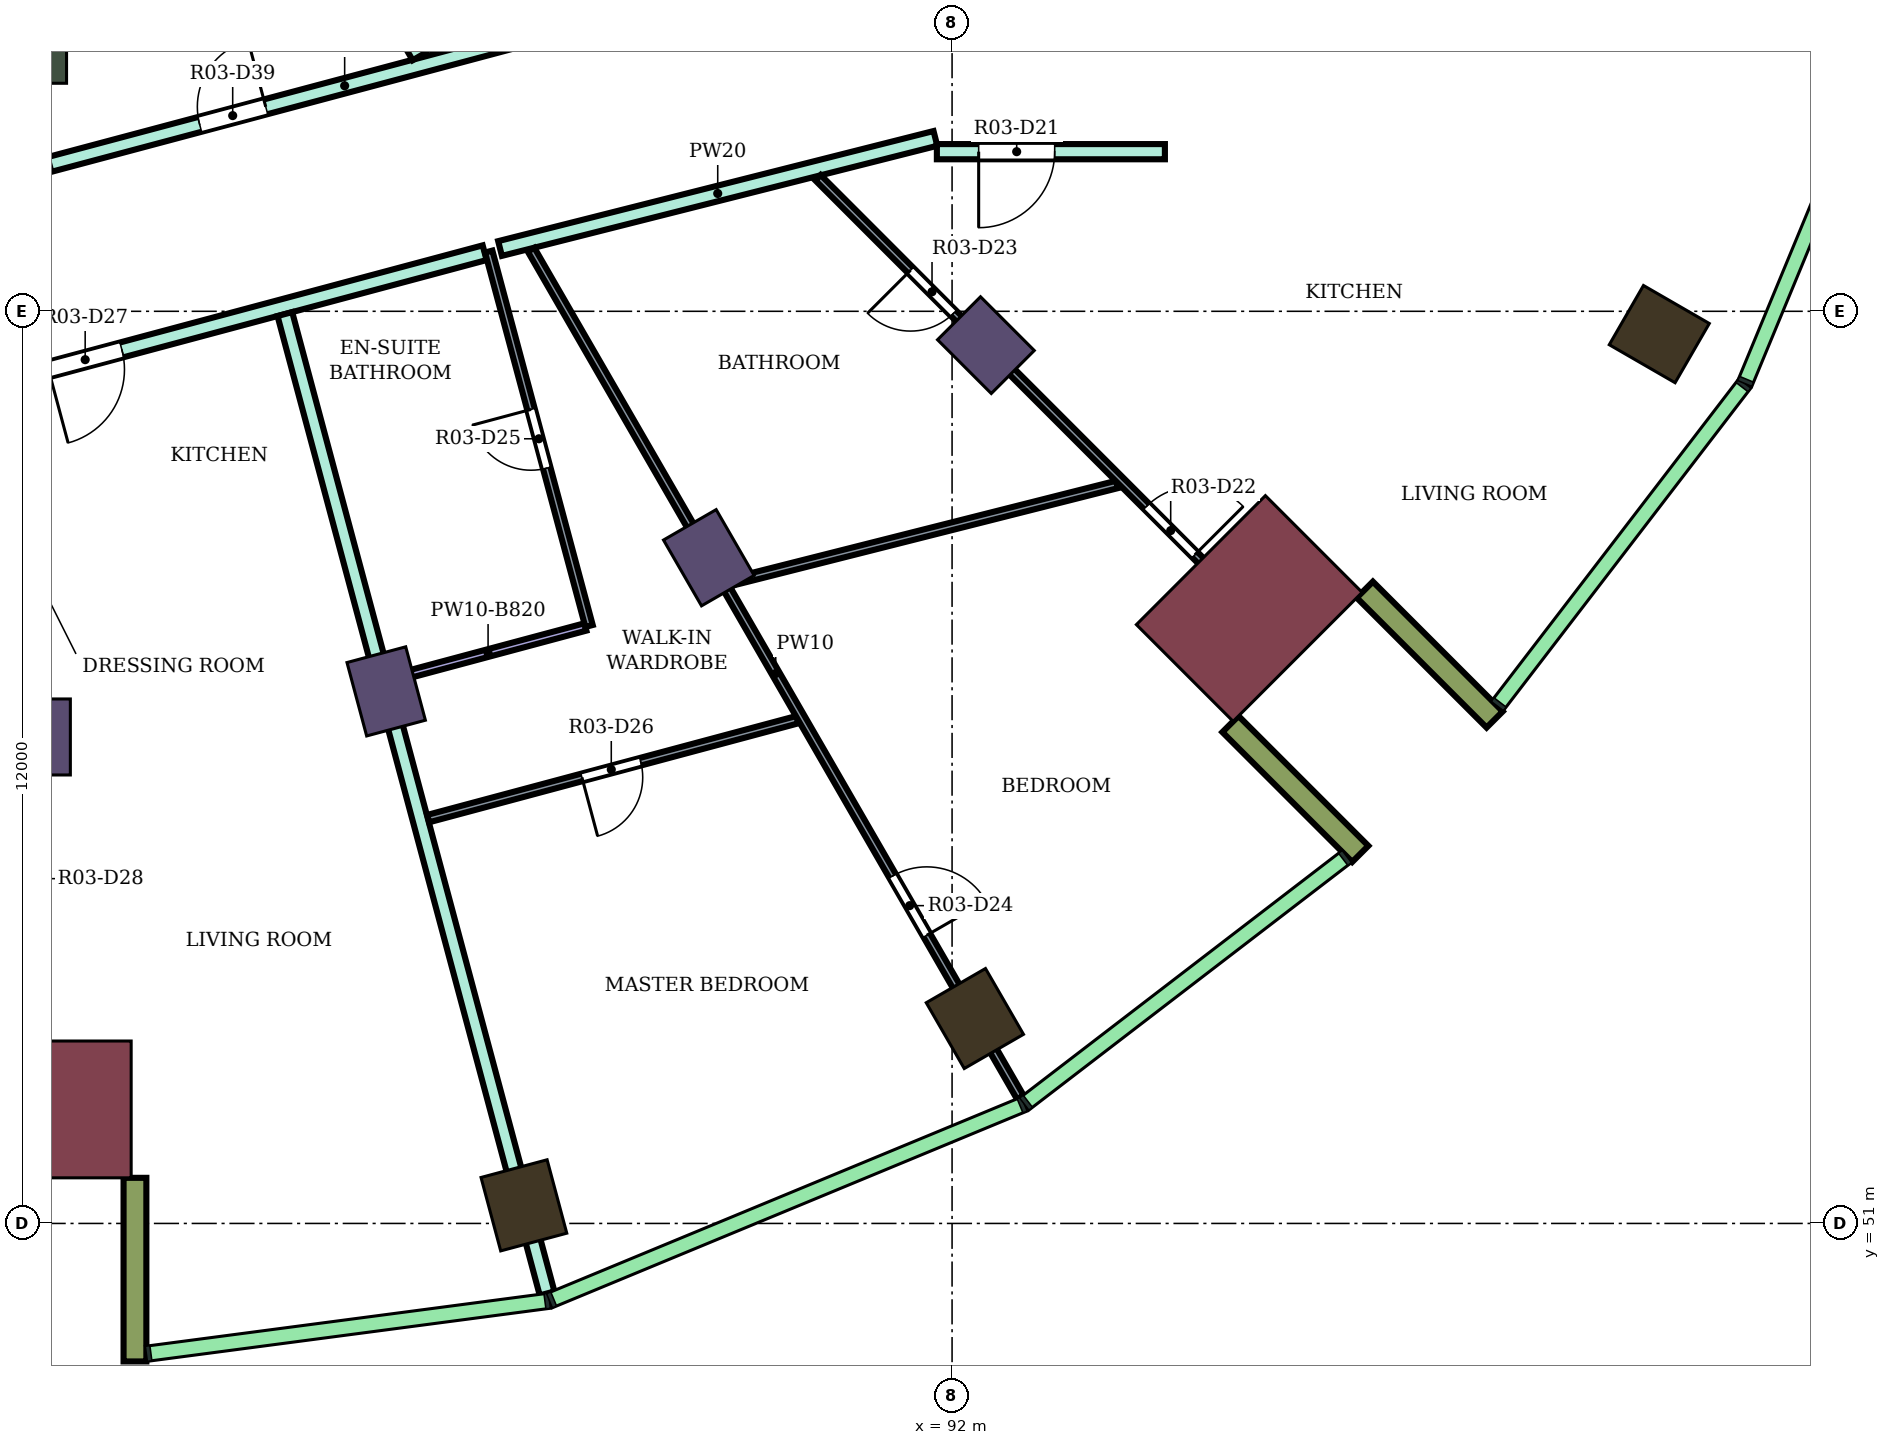
"""IFC4 building model, lengths in metres.
Left out: names, types, materials, properties, quantities, classifications, styles, units other than length and angle.
Written with IfcOpenShell. Run it as: python <this file> out.ifc"""

import sys

from ifc_helpers import new_model, si_unit, direction, frame, frame_2d, origin, origin_2d, place, context, subcontext, project, spatial, rectangle, extrude, element, fill, save


model = new_model("IFC4")
c1 = context("Model", 3, precision=1e-05, world=origin(), true_north=direction((0.0, 1.0)))
c2 = subcontext(c1, "Body", "Model", "MODEL_VIEW")
j1 = project(units=[si_unit("LENGTHUNIT", "METRE"), si_unit("PLANEANGLEUNIT", "RADIAN")], contexts=[c1])
p1 = place(None, origin())
s1 = spatial("IfcSite", under=j1, at=p1, CompositionType="ELEMENT")
p2 = place(p1, origin())
s2 = spatial("IfcBuilding", under=s1, at=p2, CompositionType="ELEMENT")
p3 = place(p2, frame((0.0, 0.0, 186.4)))
s3 = spatial("IfcBuildingStorey", under=s2, at=p3, CompositionType="ELEMENT", Elevation=186.4)
for number, where, z_axis, x_axis in (
    (1, (86.367, 51.238, 0.0), (0.0, 0.0, 1.0), (0.259, -0.966, 0.0)),
    (2, (92.3, 53.696, 0.0), (0.0, 0.0, 1.0), (0.5, -0.866, 0.0)),
    (3, (101.304, 62.7, 0.0), (0.0, 0.0, 1.0), (0.866, -0.5, 0.0)),
):
    element("IfcColumn", number, at=place(p3, frame(where, z_axis=z_axis, x_axis=x_axis)), inside=s3, PredefinedType="COLUMN", context=c2, shape_type="SweptSolid", body=[
        extrude(rectangle(XDim=1.0, YDim=0.9, at=origin_2d()), origin(), (0.0, 0.0, 1.0), 4.1),
    ])
for number, where, z_axis, x_axis in (
    (4, (80.0, 57.4, 0.0), (0.0, 0.0, 1.0), (0.0, -1.0, 0.0)),
    (5, (84.555, 58.0, 0.0), (0.0, 0.0, 1.0), (0.259, -0.966, 0.0)),
    (6, (88.8, 59.758, 0.0), (0.0, 0.0, 1.0), (0.5, -0.866, 0.0)),
    (7, (92.445, 62.555, 0.0), (0.0, 0.0, 1.0), (0.707, -0.707, 0.0)),
):
    element("IfcColumn", number, at=place(p3, frame(where, z_axis=z_axis, x_axis=x_axis)), inside=s3, PredefinedType="COLUMN", context=c2, shape_type="SweptSolid", body=[
        extrude(rectangle(XDim=1.0, YDim=0.8, at=origin_2d()), origin(), (0.0, 0.0, 1.0), 4.1),
    ])
p4 = place(p3, frame((80.0, 66.4, 0.0), z_axis=(0.0, 0.0, 1.0), x_axis=(0.0, -1.0, 0.0)))
e8 = element("IfcColumn", 8, at=p4, inside=s3, PredefinedType="COLUMN", context=c2, shape_type="SweptSolid", body=[
    extrude(rectangle(XDim=0.8, YDim=0.7, at=origin_2d()), origin(), (0.0, 0.0, 1.0), 4.1),
])
for number, where, z_axis, x_axis in (
    (9, (80.0, 52.5, 0.0), (0.0, 0.0, 1.0), (0.0, -1.0, 0.0)),
    (10, (95.91, 59.09, 0.0), (0.0, 0.0, 1.0), (0.707, -0.707, 0.0)),
):
    element("IfcColumn", number, at=place(p3, frame(where, z_axis=z_axis, x_axis=x_axis)), inside=s3, PredefinedType="COLUMN", context=c2, shape_type="SweptSolid", body=[
        extrude(rectangle(XDim=1.8, YDim=2.4, at=origin_2d()), origin(), (0.0, 0.0, 1.0), 4.1),
    ])
for number, where, z_axis, x_axis in (
    (11, (81.25, 51.6, 0.0), (0.0, 0.0, 1.0), (0.0, -1.0, 0.0)),
    (12, (95.662, 57.57, 0.0), (0.0, 0.0, 1.0), (0.707, -0.707, 0.0)),
    (13, (97.43, 59.338, 0.0), (0.0, 0.0, 1.0), (0.707, -0.707, 0.0)),
):
    element("IfcWall", number, at=place(p3, frame(where, z_axis=z_axis, x_axis=x_axis)), inside=s3, PredefinedType="NOTDEFINED", context=c2, shape_type="SweptSolid", body=[
        extrude(rectangle(XDim=2.416, YDim=0.3, at=frame_2d((1.208, 0.0))), origin(), (0.0, 0.0, 1.0), 4.1),
    ])
p5 = place(p3, frame((80.125, 64.932, 0.0), z_axis=(0.0, 0.0, 1.0), x_axis=(0.966236955806, 0.257655089674, 0.0)))
e14 = element("IfcWall", 14, at=p5, inside=s3, PredefinedType="PARTITIONING", context=c2, shape_type="SweptSolid", body=[
    extrude(rectangle(XDim=8.039, YDim=0.2, at=frame_2d((4.02, 0.0))), origin(), (0.0, 0.0, 1.0), 3.65),
])
p6 = place(p5, frame((6.298, 0.0, 0.0)))
e15 = element("IfcOpeningElement", 15, at=p6, cuts=e14, PredefinedType="OPENING", context=c2, shape_type="SweptSolid", body=[
    extrude(rectangle(XDim=0.9, YDim=2.1, at=frame_2d((0.45, 1.05))), frame((0.0, 0.11, 0.0), z_axis=(0.0, -1.0, 0.0), x_axis=(1.0, 0.0, 0.0)), (0.0, 0.0, 1.0), 0.22),
])
p7 = place(p5, frame((2.045, 0.0, 0.0)))
e16 = element("IfcOpeningElement", 16, at=p7, cuts=e14, PredefinedType="OPENING", context=c2, shape_type="SweptSolid", body=[
    extrude(rectangle(XDim=0.9, YDim=2.1, at=frame_2d((0.45, 1.05))), frame((0.0, 0.11, 0.0), z_axis=(0.0, -1.0, 0.0), x_axis=(1.0, 0.0, 0.0)), (0.0, 0.0, 1.0), 0.22),
])
p8 = place(p3, frame((80.048, 62.217, 0.0), z_axis=(0.0, 0.0, 1.0), x_axis=(0.965967276872, 0.258664299841, 0.0)))
e17 = element("IfcWall", 17, at=p8, inside=s3, PredefinedType="PARTITIONING", context=c2, shape_type="SweptSolid", body=[
    extrude(rectangle(XDim=6.007, YDim=0.2, at=frame_2d((3.003, 0.0))), origin(), (0.0, 0.0, 1.0), 3.65),
])
p9 = place(p8, frame((0.066, 0.0, 0.0)))
e18 = element("IfcOpeningElement", 18, at=p9, cuts=e17, PredefinedType="OPENING", context=c2, shape_type="SweptSolid", body=[
    extrude(rectangle(XDim=1.0, YDim=2.1, at=frame_2d((0.5, 1.05))), frame((0.0, 0.11, 0.0), z_axis=(0.0, -1.0, 0.0), x_axis=(1.0, 0.0, 0.0)), (0.0, 0.0, 1.0), 0.22),
])
p10 = place(p3, frame((83.222, 62.964, 0.0), z_axis=(0.0, 0.0, 1.0), x_axis=(0.25865252128, -0.965970430829, 0.0)))
e19 = element("IfcWall", 19, at=p10, inside=s3, PredefinedType="PARTITIONING", context=c2, shape_type="SweptSolid", body=[
    extrude(rectangle(XDim=13.338, YDim=0.2, at=frame_2d((6.669, 0.0))), origin(), (0.0, 0.0, 1.0), 3.65),
])
p11 = place(p3, frame((83.847, 68.332, 0.0), z_axis=(0.0, 0.0, 1.0), x_axis=(0.499953638813, -0.866052168773, 0.0)))
e20 = element("IfcWall", 20, at=p11, inside=s3, PredefinedType="PARTITIONING", context=c2, shape_type="SweptSolid", body=[
    extrude(rectangle(XDim=2.285, YDim=0.2, at=frame_2d((1.143, 0.0))), origin(), (0.0, 0.0, 1.0), 3.65),
])
p12 = place(p3, frame((86.053, 63.826, 0.0), z_axis=(0.0, 0.0, 1.0), x_axis=(0.969490004987, 0.245130843083, 0.0)))
e21 = element("IfcWall", 21, at=p12, inside=s3, PredefinedType="PARTITIONING", context=c2, shape_type="SweptSolid", body=[
    extrude(rectangle(XDim=5.908, YDim=0.2, at=frame_2d((2.954, 0.0))), origin(), (0.0, 0.0, 1.0), 3.65),
])
p13 = place(p3, frame((91.8, 65.1, 0.0), z_axis=(0.0, 0.0, 1.0), x_axis=(1.0, 0.0, 0.0)))
e22 = element("IfcWall", 22, at=p13, inside=s3, PredefinedType="PARTITIONING", context=c2, shape_type="SweptSolid", body=[
    extrude(rectangle(XDim=3.0, YDim=0.2, at=frame_2d((1.5, 0.0))), origin(), (0.0, 0.0, 1.0), 3.65),
])
p14 = place(p13, frame((0.55, 0.0, 0.0)))
e23 = element("IfcOpeningElement", 23, at=p14, cuts=e22, PredefinedType="OPENING", context=c2, shape_type="SweptSolid", body=[
    extrude(rectangle(XDim=1.0, YDim=2.1, at=frame_2d((0.5, 1.05))), frame((0.0, 0.11, 0.0), z_axis=(0.0, -1.0, 0.0), x_axis=(1.0, 0.0, 0.0)), (0.0, 0.0, 1.0), 0.22),
])
p15 = place(p3, frame((84.615, 58.161, 0.0), z_axis=(0.0, 0.0, 1.0), x_axis=(0.965902408875, 0.258906424273, 0.0)))
e24 = element("IfcWall", 24, at=p15, inside=s3, PredefinedType="PARTITIONING", context=c2, shape_type="SweptSolid", body=[
    extrude(rectangle(XDim=2.651, YDim=0.1, at=frame_2d((1.325, 0.0))), origin(), (0.0, 0.0, 1.0), 3.28),
])
p16 = place(p3, frame((85.108, 56.326, 0.0), z_axis=(0.0, 0.0, 1.0), x_axis=(0.965919870225, 0.258841272413, 0.0)))
e25 = element("IfcWall", 25, at=p16, inside=s3, PredefinedType="PARTITIONING", context=c2, shape_type="SweptSolid", body=[
    extrude(rectangle(XDim=5.027, YDim=0.1, at=frame_2d((2.514, 0.0))), origin(), (0.0, 0.0, 1.0), 3.65),
])
p17 = place(p16, frame((2.094, 0.0, 0.0)))
e26 = element("IfcOpeningElement", 26, at=p17, cuts=e25, PredefinedType="OPENING", context=c2, shape_type="SweptSolid", body=[
    extrude(rectangle(XDim=0.8, YDim=2.1, at=frame_2d((0.4, 1.05))), frame((0.0, 0.06, 0.0), z_axis=(0.0, -1.0, 0.0), x_axis=(1.0, 0.0, 0.0)), (0.0, 0.0, 1.0), 0.12),
])
p18 = place(p3, frame((85.904, 63.786, 0.0), z_axis=(0.0, 0.0, 1.0), x_axis=(0.258857329124, -0.965915567303, 0.0)))
e27 = element("IfcWall", 27, at=p18, inside=s3, PredefinedType="PARTITIONING", context=c2, shape_type="SweptSolid", body=[
    extrude(rectangle(XDim=5.1, YDim=0.1, at=frame_2d((2.55, 0.0))), origin(), (0.0, 0.0, 1.0), 3.65),
])
p19 = place(p18, frame((2.15, 0.0, 0.0)))
e28 = element("IfcOpeningElement", 28, at=p19, cuts=e27, PredefinedType="OPENING", context=c2, shape_type="SweptSolid", body=[
    extrude(rectangle(XDim=0.8, YDim=2.1, at=frame_2d((0.4, 1.05))), frame((0.0, 0.06, 0.0), z_axis=(0.0, -1.0, 0.0), x_axis=(1.0, 0.0, 0.0)), (0.0, 0.0, 1.0), 0.12),
])
p20 = place(p3, frame((86.461, 63.81, 0.0), z_axis=(0.0, 0.0, 1.0), x_axis=(0.499911751641, -0.866076348004, 0.0)))
e29 = element("IfcWall", 29, at=p20, inside=s3, PredefinedType="PARTITIONING", context=c2, shape_type="SweptSolid", body=[
    extrude(rectangle(XDim=12.876, YDim=0.1, at=frame_2d((6.438, 0.0))), origin(), (0.0, 0.0, 1.0), 3.65),
])
p21 = place(p20, frame((9.514, 0.0, 0.0)))
e30 = element("IfcOpeningElement", 30, at=p21, cuts=e29, PredefinedType="OPENING", context=c2, shape_type="SweptSolid", body=[
    extrude(rectangle(XDim=0.9, YDim=2.1, at=frame_2d((0.45, 1.05))), frame((0.0, 0.06, 0.0), z_axis=(0.0, -1.0, 0.0), x_axis=(1.0, 0.0, 0.0)), (0.0, 0.0, 1.0), 0.12),
])
p22 = place(p3, frame((89.058, 59.429, 0.0), z_axis=(0.0, 0.0, 1.0), x_axis=(0.96946321375, 0.2452367778, 0.0)))
e31 = element("IfcWall", 31, at=p22, inside=s3, PredefinedType="PARTITIONING", context=c2, shape_type="SweptSolid", body=[
    extrude(rectangle(XDim=5.272, YDim=0.1, at=frame_2d((2.636, 0.0))), origin(), (0.0, 0.0, 1.0), 3.65),
])
p23 = place(p3, frame((90.236, 64.758, 0.0), z_axis=(0.0, 0.0, 1.0), x_axis=(0.706924769926, -0.707288745609, 0.0)))
e32 = element("IfcWall", 32, at=p23, inside=s3, PredefinedType="PARTITIONING", context=c2, shape_type="SweptSolid", body=[
    extrude(rectangle(XDim=8.72, YDim=0.1, at=frame_2d((4.36, 0.0))), origin(), (0.0, 0.0, 1.0), 3.65),
])
p24 = place(p23, frame((6.114, 0.0, 0.0)))
e33 = element("IfcOpeningElement", 33, at=p24, cuts=e32, PredefinedType="OPENING", context=c2, shape_type="SweptSolid", body=[
    extrude(rectangle(XDim=0.9, YDim=2.1, at=frame_2d((0.45, 1.05))), frame((0.0, 0.06, 0.0), z_axis=(0.0, -1.0, 0.0), x_axis=(1.0, 0.0, 0.0)), (0.0, 0.0, 1.0), 0.12),
])
p25 = place(p23, frame((1.722, 0.0, 0.0)))
e34 = element("IfcOpeningElement", 34, at=p25, cuts=e32, PredefinedType="OPENING", context=c2, shape_type="SweptSolid", body=[
    extrude(rectangle(XDim=0.8, YDim=2.1, at=frame_2d((0.4, 1.05))), frame((0.0, 0.06, 0.0), z_axis=(0.0, -1.0, 0.0), x_axis=(1.0, 0.0, 0.0)), (0.0, 0.0, 1.0), 0.12),
])
p26 = place(p14, frame((1.0, 0.0, 0.0), z_axis=(0.0, 0.0, 1.0), x_axis=(-1.0, 0.0, 0.0)))
e35 = element("IfcDoor", 35, at=p26, inside=s3, OperationType="SINGLE_SWING_RIGHT", PredefinedType="DOOR", context=c2, shape_type="SweptSolid", body=[
    extrude(rectangle(XDim=1.0, YDim=2.1, at=frame_2d((0.5, 1.05))), frame((0.0, 0.025, 0.0), z_axis=(0.0, -1.0, 0.0), x_axis=(1.0, 0.0, 0.0)), (0.0, 0.0, 1.0), 0.05),
])
fill(e23, e35)
p27 = place(p24, origin())
e36 = element("IfcDoor", 36, at=p27, inside=s3, OperationType="SINGLE_SWING_RIGHT", PredefinedType="DOOR", context=c2, shape_type="SweptSolid", body=[
    extrude(rectangle(XDim=0.9, YDim=2.1, at=frame_2d((0.45, 1.05))), frame((0.0, 0.025, 0.0), z_axis=(0.0, -1.0, 0.0), x_axis=(1.0, 0.0, 0.0)), (0.0, 0.0, 1.0), 0.05),
])
fill(e33, e36)
p28 = place(p25, frame((0.8, 0.0, 0.0), z_axis=(0.0, 0.0, 1.0), x_axis=(-1.0, 0.0, 0.0)))
e37 = element("IfcDoor", 37, at=p28, inside=s3, OperationType="SINGLE_SWING_RIGHT", PredefinedType="DOOR", context=c2, shape_type="SweptSolid", body=[
    extrude(rectangle(XDim=0.8, YDim=2.1, at=frame_2d((0.4, 1.05))), frame((0.0, 0.025, 0.0), z_axis=(0.0, -1.0, 0.0), x_axis=(1.0, 0.0, 0.0)), (0.0, 0.0, 1.0), 0.05),
])
fill(e34, e37)
p29 = place(p21, origin())
e38 = element("IfcDoor", 38, at=p29, inside=s3, OperationType="SINGLE_SWING_RIGHT", PredefinedType="DOOR", context=c2, shape_type="SweptSolid", body=[
    extrude(rectangle(XDim=0.9, YDim=2.1, at=frame_2d((0.45, 1.05))), frame((0.0, 0.025, 0.0), z_axis=(0.0, -1.0, 0.0), x_axis=(1.0, 0.0, 0.0)), (0.0, 0.0, 1.0), 0.05),
])
fill(e30, e38)
p30 = place(p19, frame((0.8, 0.0, 0.0), z_axis=(0.0, 0.0, 1.0), x_axis=(-1.0, 0.0, 0.0)))
e39 = element("IfcDoor", 39, at=p30, inside=s3, OperationType="SINGLE_SWING_RIGHT", PredefinedType="DOOR", context=c2, shape_type="SweptSolid", body=[
    extrude(rectangle(XDim=0.8, YDim=2.1, at=frame_2d((0.4, 1.05))), frame((0.0, 0.025, 0.0), z_axis=(0.0, -1.0, 0.0), x_axis=(1.0, 0.0, 0.0)), (0.0, 0.0, 1.0), 0.05),
])
fill(e28, e39)
p31 = place(p17, frame((0.8, 0.0, 0.0), z_axis=(0.0, 0.0, 1.0), x_axis=(-1.0, 0.0, 0.0)))
e40 = element("IfcDoor", 40, at=p31, inside=s3, OperationType="SINGLE_SWING_RIGHT", PredefinedType="DOOR", context=c2, shape_type="SweptSolid", body=[
    extrude(rectangle(XDim=0.8, YDim=2.1, at=frame_2d((0.4, 1.05))), frame((0.0, 0.025, 0.0), z_axis=(0.0, -1.0, 0.0), x_axis=(1.0, 0.0, 0.0)), (0.0, 0.0, 1.0), 0.05),
])
fill(e26, e40)
p32 = place(p9, frame((1.0, 0.0, 0.0), z_axis=(0.0, 0.0, 1.0), x_axis=(-1.0, 0.0, 0.0)))
e41 = element("IfcDoor", 41, at=p32, inside=s3, OperationType="SINGLE_SWING_RIGHT", PredefinedType="DOOR", context=c2, shape_type="SweptSolid", body=[
    extrude(rectangle(XDim=1.0, YDim=2.1, at=frame_2d((0.5, 1.05))), frame((0.0, 0.025, 0.0), z_axis=(0.0, -1.0, 0.0), x_axis=(1.0, 0.0, 0.0)), (0.0, 0.0, 1.0), 0.05),
])
fill(e18, e41)
p33 = place(p7, origin())
e42 = element("IfcDoor", 42, at=p33, inside=s3, OperationType="SINGLE_SWING_RIGHT", PredefinedType="DOOR", context=c2, shape_type="SweptSolid", body=[
    extrude(rectangle(XDim=0.9, YDim=2.1, at=frame_2d((0.45, 1.05))), frame((0.0, 0.025, 0.0), z_axis=(0.0, -1.0, 0.0), x_axis=(1.0, 0.0, 0.0)), (0.0, 0.0, 1.0), 0.05),
])
fill(e16, e42)
save(model, sys.argv[1])
